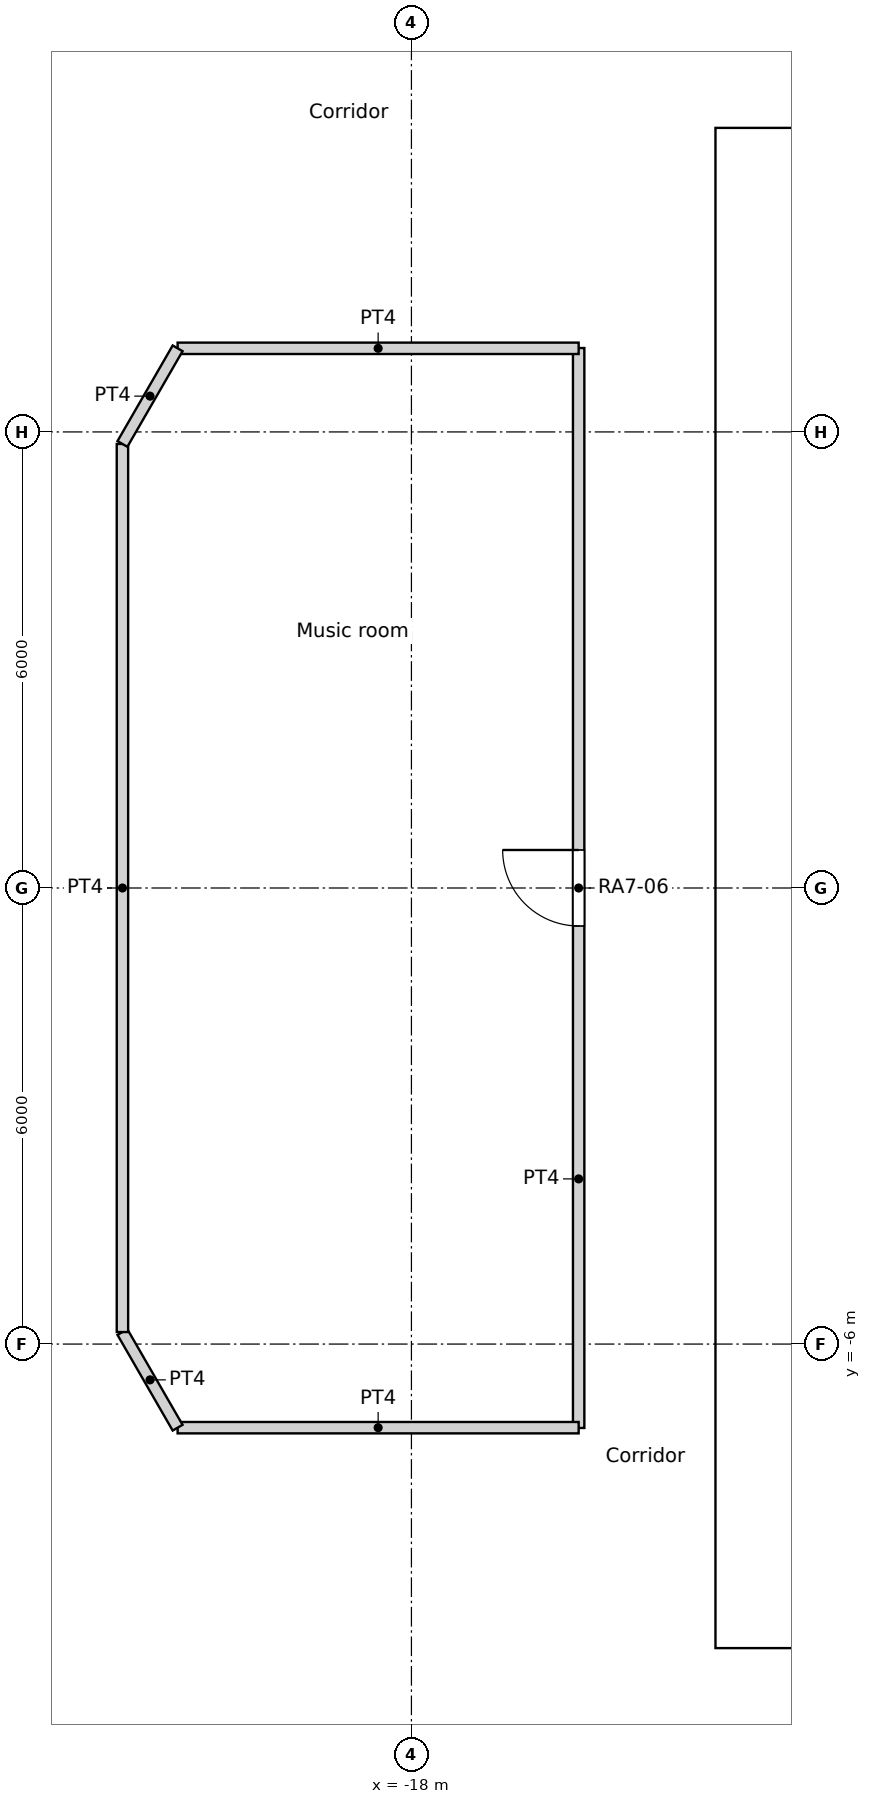
"""IFC4 building model, lengths in metres.
Left out: names, types, materials, properties, quantities, classifications, styles, units other than length and angle.
Written with IfcOpenShell. Run it as: python <this file> out.ifc"""

import sys

from ifc_helpers import new_model, si_unit, direction, frame, frame_2d, origin, origin_2d, place, context, subcontext, project, spatial, rectangle, circle, extrude, element, fill, save


model = new_model("IFC4")
c1 = context("Model", 3, precision=1e-05, world=origin(), true_north=direction((0.0, 1.0)))
c2 = subcontext(c1, "Body", "Model", "MODEL_VIEW")
j1 = project(units=[si_unit("LENGTHUNIT", "METRE"), si_unit("PLANEANGLEUNIT", "RADIAN")], contexts=[c1])
p1 = place(None, origin())
s1 = spatial("IfcSite", under=j1, at=p1, CompositionType="ELEMENT")
p2 = place(p1, origin())
s2 = spatial("IfcBuilding", under=s1, at=p2, CompositionType="ELEMENT")
p3 = place(p2, frame((0.0, 0.0, 93.0)))
s3 = spatial("IfcBuildingStorey", under=s2, at=p3, CompositionType="ELEMENT", Elevation=93.0)
for number, where, z_axis, x_axis in (
    (1, (-23.067, 8.396, 0.0), (0.0, 0.0, 1.0), (1.0, 0.0, 0.0)),
    (2, (-23.067, -8.396, 0.0), (0.0, 0.0, 1.0), (1.0, 0.0, 0.0)),
):
    element("IfcColumn", number, at=place(p3, frame(where, z_axis=z_axis, x_axis=x_axis)), inside=s3, PredefinedType="COLUMN", context=c2, shape_type="SweptSolid", body=[
        extrude(circle(Radius=0.65, at=origin_2d()), origin(), (0.0, 0.0, 1.0), 3.6),
    ])
for number, where, z_axis, x_axis in (
    (3, (-16.958, 8.167, 0.0), (0.0, 0.0, 1.0), (1.0, 0.0, 0.0)),
    (4, (-18.612, 2.805, 0.0), (0.0, 0.0, 1.0), (1.0, 0.0, 0.0)),
    (5, (-18.612, -2.805, 0.0), (0.0, 0.0, 1.0), (1.0, 0.0, 0.0)),
    (6, (-16.958, -8.167, 0.0), (0.0, 0.0, 1.0), (1.0, 0.0, 0.0)),
):
    element("IfcColumn", number, at=place(p3, frame(where, z_axis=z_axis, x_axis=x_axis)), inside=s3, PredefinedType="COLUMN", context=c2, shape_type="SweptSolid", body=[
        extrude(circle(Radius=0.7, at=origin_2d()), origin(), (0.0, 0.0, 1.0), 3.6),
    ])
p4 = place(p3, frame((-14.0, -9.4, 0.0), z_axis=(0.0, 0.0, 1.0), x_axis=(1.0, 0.0, 0.0)))
e7 = element("IfcWall", 7, at=p4, inside=s3, PredefinedType="SOLIDWALL", context=c2, shape_type="SweptSolid", body=[
    extrude(rectangle(XDim=28.0, YDim=1.2, at=frame_2d((14.0, 0.0))), origin(), (0.0, 0.0, 1.0), 3.6),
])
p5 = place(p4, frame((14.9, 0.0, 0.0)))
e8 = element("IfcOpeningElement", 8, at=p5, cuts=e7, PredefinedType="OPENING", context=c2, shape_type="SweptSolid", body=[
    extrude(rectangle(XDim=1.0, YDim=2.1, at=frame_2d((0.5, 1.05))), frame((0.0, 0.6, 0.0), z_axis=(0.0, -1.0, 0.0), x_axis=(1.0, 0.0, 0.0)), (0.0, 0.0, 1.0), 1.2),
])
p6 = place(p4, frame((9.8, 0.0, 0.0)))
e9 = element("IfcOpeningElement", 9, at=p6, cuts=e7, PredefinedType="OPENING", context=c2, shape_type="SweptSolid", body=[
    extrude(rectangle(XDim=1.8, YDim=2.1, at=frame_2d((0.9, 1.05))), frame((0.0, 0.6, 0.0), z_axis=(0.0, -1.0, 0.0), x_axis=(1.0, 0.0, 0.0)), (0.0, 0.0, 1.0), 1.2),
])
p7 = place(p4, frame((16.4, 0.0, 0.0)))
e10 = element("IfcOpeningElement", 10, at=p7, cuts=e7, PredefinedType="OPENING", context=c2, shape_type="SweptSolid", body=[
    extrude(rectangle(XDim=1.8, YDim=2.1, at=frame_2d((0.9, 1.05))), frame((0.0, 0.6, 0.0), z_axis=(0.0, -1.0, 0.0), x_axis=(1.0, 0.0, 0.0)), (0.0, 0.0, 1.0), 1.2),
])
p8 = place(p3, frame((-14.0, 9.4, 0.0), z_axis=(0.0, 0.0, 1.0), x_axis=(1.0, 0.0, 0.0)))
e11 = element("IfcWall", 11, at=p8, inside=s3, PredefinedType="SOLIDWALL", context=c2, shape_type="SweptSolid", body=[
    extrude(rectangle(XDim=28.0, YDim=1.2, at=frame_2d((14.0, 0.0))), origin(), (0.0, 0.0, 1.0), 3.6),
])
p9 = place(p8, frame((9.8, 0.0, 0.0)))
e12 = element("IfcOpeningElement", 12, at=p9, cuts=e11, PredefinedType="OPENING", context=c2, shape_type="SweptSolid", body=[
    extrude(rectangle(XDim=1.8, YDim=2.1, at=frame_2d((0.9, 1.05))), frame((0.0, 0.6, 0.0), z_axis=(0.0, -1.0, 0.0), x_axis=(1.0, 0.0, 0.0)), (0.0, 0.0, 1.0), 1.2),
])
p10 = place(p3, frame((-13.4, -8.8, 0.0), z_axis=(0.0, 0.0, 1.0), x_axis=(0.0, 1.0, 0.0)))
e13 = element("IfcWall", 13, at=p10, inside=s3, PredefinedType="SOLIDWALL", context=c2, shape_type="SweptSolid", body=[
    extrude(rectangle(XDim=17.6, YDim=1.2, at=frame_2d((8.8, 0.0))), origin(), (0.0, 0.0, 1.0), 3.6),
])
p11 = place(p10, frame((5.2, 0.0, 0.0)))
e14 = element("IfcOpeningElement", 14, at=p11, cuts=e13, PredefinedType="OPENING", context=c2, shape_type="SweptSolid", body=[
    extrude(rectangle(XDim=1.0, YDim=2.1, at=frame_2d((0.5, 1.05))), frame((0.0, 0.6, 0.0), z_axis=(0.0, -1.0, 0.0), x_axis=(1.0, 0.0, 0.0)), (0.0, 0.0, 1.0), 1.2),
])
p12 = place(p10, frame((11.4, 0.0, 0.0)))
e15 = element("IfcOpeningElement", 15, at=p12, cuts=e13, PredefinedType="OPENING", context=c2, shape_type="SweptSolid", body=[
    extrude(rectangle(XDim=1.0, YDim=2.1, at=frame_2d((0.5, 1.05))), frame((0.0, 0.6, 0.0), z_axis=(0.0, -1.0, 0.0), x_axis=(1.0, 0.0, 0.0)), (0.0, 0.0, 1.0), 1.2),
])
p13 = place(p3, frame((-15.8, -7.104, 0.0), z_axis=(0.0, 0.0, 1.0), x_axis=(0.0, 1.0, 0.0)))
e16 = element("IfcWall", 16, at=p13, inside=s3, PredefinedType="PARTITIONING", context=c2, shape_type="SweptSolid", body=[
    extrude(rectangle(XDim=14.208, YDim=0.15, at=frame_2d((7.104, 0.0))), origin(), (0.0, 0.0, 1.0), 3.15),
])
p14 = place(p13, frame((6.604, 0.0, 0.0)))
e17 = element("IfcOpeningElement", 17, at=p14, cuts=e16, PredefinedType="OPENING", context=c2, shape_type="SweptSolid", body=[
    extrude(rectangle(XDim=1.0, YDim=2.04, at=frame_2d((0.5, 1.02))), frame((0.0, 0.075, 0.0), z_axis=(0.0, -1.0, 0.0), x_axis=(1.0, 0.0, 0.0)), (0.0, 0.0, 1.0), 0.15),
])
p15 = place(p3, frame((-21.076, 7.1, 0.0), z_axis=(0.0, 0.0, 1.0), x_axis=(1.0, 0.0, 0.0)))
e18 = element("IfcWall", 18, at=p15, inside=s3, PredefinedType="PARTITIONING", context=c2, shape_type="SweptSolid", body=[
    extrude(rectangle(XDim=5.276, YDim=0.15, at=frame_2d((2.638, 0.0))), origin(), (0.0, 0.0, 1.0), 3.15),
])
p16 = place(p3, frame((-21.802, 5.842, 0.0), z_axis=(0.0, 0.0, 1.0), x_axis=(0.499863102386, 0.866104427234, 0.0)))
e19 = element("IfcWall", 19, at=p16, inside=s3, PredefinedType="PARTITIONING", context=c2, shape_type="SweptSolid", body=[
    extrude(rectangle(XDim=1.453, YDim=0.15, at=frame_2d((0.726, 0.0))), origin(), (0.0, 0.0, 1.0), 3.15),
])
p17 = place(p3, frame((-21.802, -5.842, 0.0), z_axis=(0.0, 0.0, 1.0), x_axis=(0.0, 1.0, 0.0)))
e20 = element("IfcWall", 20, at=p17, inside=s3, PredefinedType="PARTITIONING", context=c2, shape_type="SweptSolid", body=[
    extrude(rectangle(XDim=11.684, YDim=0.15, at=frame_2d((5.842, 0.0))), origin(), (0.0, 0.0, 1.0), 3.15),
])
p18 = place(p3, frame((-21.802, -5.842, 0.0), z_axis=(0.0, 0.0, 1.0), x_axis=(0.499863102386, -0.866104427234, 0.0)))
e21 = element("IfcWall", 21, at=p18, inside=s3, PredefinedType="PARTITIONING", context=c2, shape_type="SweptSolid", body=[
    extrude(rectangle(XDim=1.453, YDim=0.15, at=frame_2d((0.726, 0.0))), origin(), (0.0, 0.0, 1.0), 3.15),
])
p19 = place(p3, frame((-21.076, -7.1, 0.0), z_axis=(0.0, 0.0, 1.0), x_axis=(1.0, 0.0, 0.0)))
e22 = element("IfcWall", 22, at=p19, inside=s3, PredefinedType="PARTITIONING", context=c2, shape_type="SweptSolid", body=[
    extrude(rectangle(XDim=5.276, YDim=0.15, at=frame_2d((2.638, 0.0))), origin(), (0.0, 0.0, 1.0), 3.15),
])
p20 = place(p3, frame((-25.251, 7.414, 0.0), z_axis=(0.0, 0.0, 1.0), x_axis=(0.540498462047, 0.84134500208, 0.0)))
e23 = element("IfcWall", 23, at=p20, inside=s3, PredefinedType="PARTITIONING", context=c2, shape_type="SweptSolid", body=[
    extrude(rectangle(XDim=12.811, YDim=0.15, at=frame_2d((6.405, 0.0))), origin(), (0.0, 0.0, 1.0), 3.15),
])
p21 = place(p20, frame((10.817, 0.0, 0.0)))
e24 = element("IfcOpeningElement", 24, at=p21, cuts=e23, PredefinedType="OPENING", context=c2, shape_type="SweptSolid", body=[
    extrude(rectangle(XDim=1.0, YDim=2.1, at=frame_2d((0.5, 1.05))), frame((0.0, 0.075, 0.0), z_axis=(0.0, -1.0, 0.0), x_axis=(1.0, 0.0, 0.0)), (0.0, 0.0, 1.0), 0.15),
])
p22 = place(p20, frame((5.603, 0.0, 0.0)))
e25 = element("IfcOpeningElement", 25, at=p22, cuts=e23, PredefinedType="OPENING", context=c2, shape_type="SweptSolid", body=[
    extrude(rectangle(XDim=1.0, YDim=2.1, at=frame_2d((0.5, 1.05))), frame((0.0, 0.075, 0.0), z_axis=(0.0, -1.0, 0.0), x_axis=(1.0, 0.0, 0.0)), (0.0, 0.0, 1.0), 0.15),
])
p23 = place(p3, frame((-25.253, -7.415, 0.0), z_axis=(0.0, 0.0, 1.0), x_axis=(0.540656073354, -0.841243728265, 0.0)))
e26 = element("IfcWall", 26, at=p23, inside=s3, PredefinedType="PARTITIONING", context=c2, shape_type="SweptSolid", body=[
    extrude(rectangle(XDim=14.829, YDim=0.15, at=frame_2d((7.415, 0.0))), origin(), (0.0, 0.0, 1.0), 3.15),
])
p24 = place(p23, frame((4.804, 0.0, 0.0)))
e27 = element("IfcOpeningElement", 27, at=p24, cuts=e26, PredefinedType="OPENING", context=c2, shape_type="SweptSolid", body=[
    extrude(rectangle(XDim=1.8, YDim=2.1, at=frame_2d((0.9, 1.05))), frame((0.0, 0.075, 0.0), z_axis=(0.0, -1.0, 0.0), x_axis=(1.0, 0.0, 0.0)), (0.0, 0.0, 1.0), 0.15),
])
p25 = place(p11, origin())
e28 = element("IfcDoor", 28, at=p25, inside=s3, OperationType="DOUBLE_DOOR_SINGLE_SWING", PredefinedType="DOOR", context=c2, shape_type="SweptSolid", body=[
    extrude(rectangle(XDim=1.0, YDim=2.1, at=frame_2d((0.5, 1.05))), frame((0.0, 0.025, 0.0), z_axis=(0.0, -1.0, 0.0), x_axis=(1.0, 0.0, 0.0)), (0.0, 0.0, 1.0), 0.05),
])
fill(e14, e28)
p26 = place(p12, origin())
e29 = element("IfcDoor", 29, at=p26, inside=s3, OperationType="DOUBLE_DOOR_SINGLE_SWING", PredefinedType="DOOR", context=c2, shape_type="SweptSolid", body=[
    extrude(rectangle(XDim=1.0, YDim=2.1, at=frame_2d((0.5, 1.05))), frame((0.0, 0.025, 0.0), z_axis=(0.0, -1.0, 0.0), x_axis=(1.0, 0.0, 0.0)), (0.0, 0.0, 1.0), 0.05),
])
fill(e15, e29)
p27 = place(p14, origin())
e30 = element("IfcDoor", 30, at=p27, inside=s3, OperationType="SINGLE_SWING_RIGHT", PredefinedType="DOOR", context=c2, shape_type="SweptSolid", body=[
    extrude(rectangle(XDim=1.0, YDim=2.04, at=frame_2d((0.5, 1.02))), frame((0.0, 0.025, 0.0), z_axis=(0.0, -1.0, 0.0), x_axis=(1.0, 0.0, 0.0)), (0.0, 0.0, 1.0), 0.05),
])
fill(e17, e30)
save(model, sys.argv[1])
